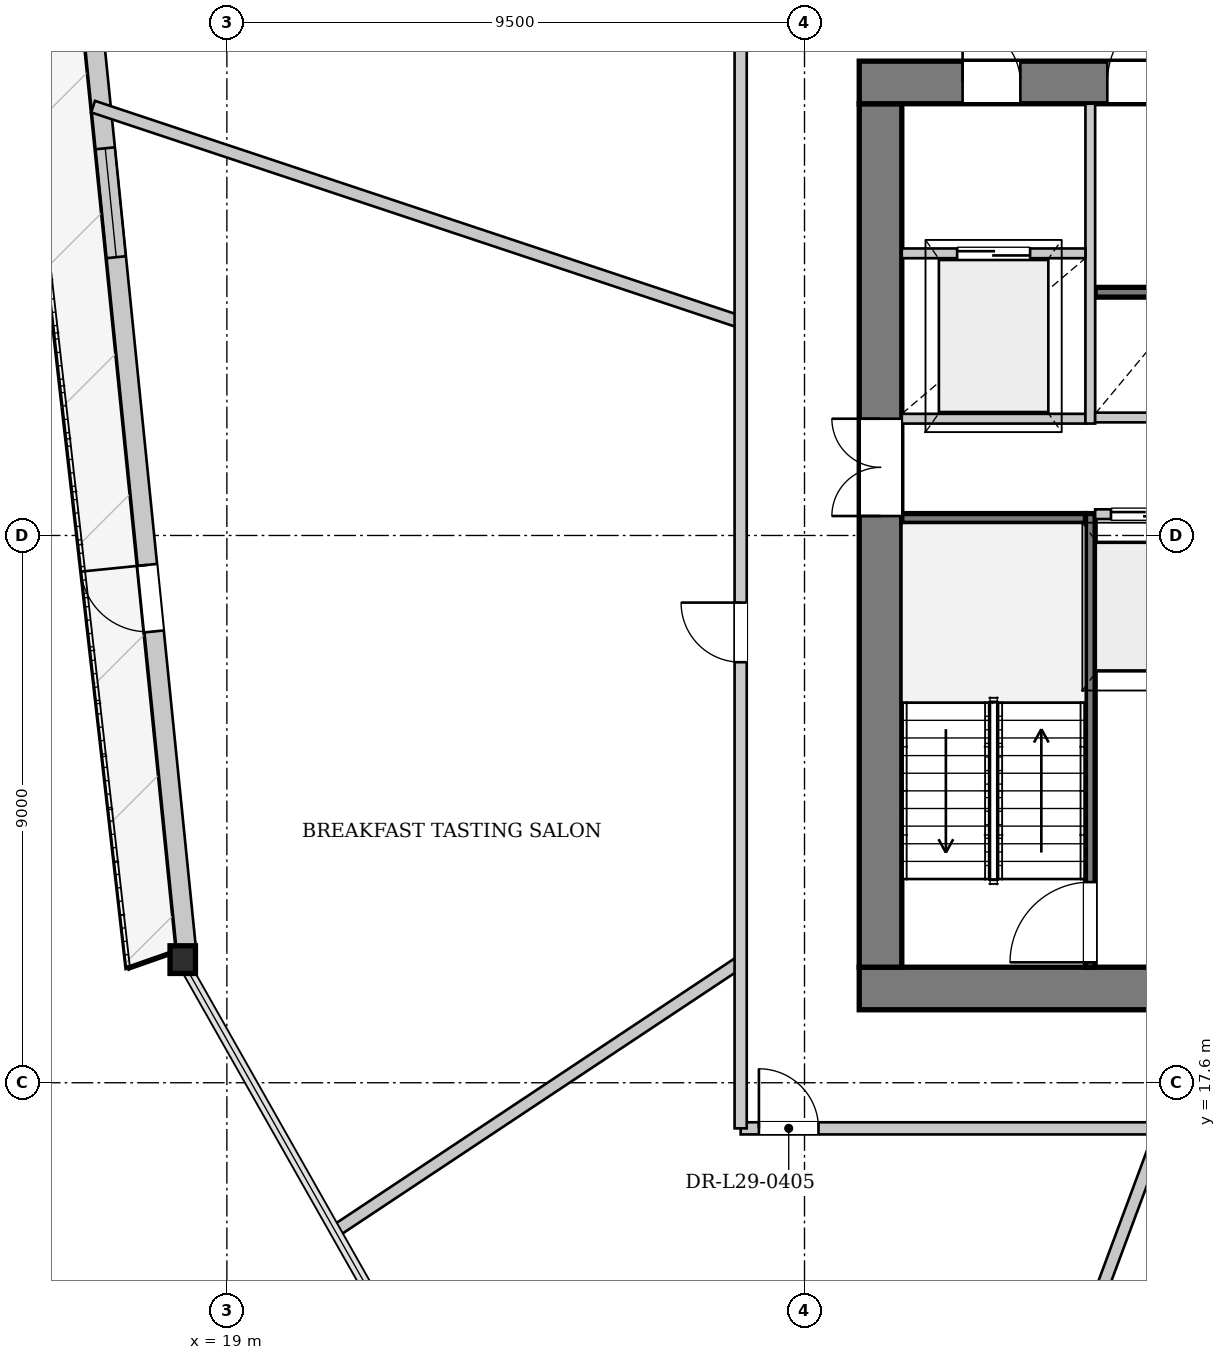
"""IFC4 building model, lengths in metres.
Left out: names, types, materials, properties, quantities, classifications, styles, units other than length and angle.
Written with IfcOpenShell. Run it as: python <this file> out.ifc"""

import sys

from ifc_helpers import new_model, si_unit, direction, frame, frame_2d, origin, origin_2d, place, context, subcontext, project, spatial, rectangle, i_section, extrude, source, transform, mapped, element, fill, save


model = new_model("IFC4")
c1 = context("Model", 3, precision=1e-05, world=origin(), true_north=direction((0.0, 1.0)))
c2 = subcontext(c1, "Body", "Model", "MODEL_VIEW")
j1 = project(units=[si_unit("LENGTHUNIT", "METRE"), si_unit("PLANEANGLEUNIT", "RADIAN")], contexts=[c1])
p1 = place(None, origin())
s1 = spatial("IfcSite", under=j1, at=p1, CompositionType="ELEMENT")
p2 = place(p1, origin())
s2 = spatial("IfcBuilding", under=s1, at=p2, CompositionType="ELEMENT")
p3 = place(p2, frame((0.0, 0.0, 112.8)))
s3 = spatial("IfcBuildingStorey", under=s2, at=p3, CompositionType="ELEMENT", Elevation=112.8)
m1 = source(origin(), c2, "Body", "SweptSolid", [
    extrude(i_section(OverallWidth=0.418, OverallDepth=0.455, WebThickness=0.038, FlangeThickness=0.059, at=origin_2d()), origin(), (0.0, 0.0, 1.0), 3.402),
])
p4 = place(p3, frame((18.175, 19.764, 0.0), z_axis=(0.058410255518, -0.082090088836, 0.994911784715), x_axis=(0.8147908412, 0.579755021623, 0.0)))
e1 = element("IfcColumn", 1, at=p4, inside=s3, PredefinedType="COLUMN", context=c2, shape_type="MappedRepresentation", body=[
    mapped(m1, transform((0.0, 0.0, 0.0), x_axis=(1.0, 0.0, 0.0), y_axis=(0.0, 1.0, 0.0), z_axis=(0.0, 0.0, 1.0), scale=1.0)),
])
p5 = place(p3, frame((52.022, 16.023, 0.0), z_axis=(0.0, 0.0, 1.0), x_axis=(-0.831442115586, -0.55561138256, 0.0)))
e2 = element("IfcWall", 2, at=p5, inside=s3, PredefinedType="SOLIDWALL", context=c2, shape_type="SweptSolid", body=[
    extrude(rectangle(XDim=23.92, YDim=0.32, at=frame_2d((11.96, 0.0))), origin(), (0.0, 0.0, 1.0), 2.692),
])
p6 = place(p5, frame((7.104, 0.0, 0.0)))
e3 = element("IfcOpeningElement", 3, at=p6, cuts=e2, PredefinedType="OPENING", context=c2, shape_type="SweptSolid", body=[
    extrude(rectangle(XDim=1.1, YDim=2.3, at=frame_2d((0.55, 1.15))), frame((0.0, 0.17, 0.0), z_axis=(0.0, -1.0, 0.0), x_axis=(1.0, 0.0, 0.0)), (0.0, 0.0, 1.0), 0.34),
])
p7 = place(p5, frame((16.801, 0.0, 0.372)))
e4 = element("IfcOpeningElement", 4, at=p7, cuts=e2, PredefinedType="OPENING", context=c2, shape_type="SweptSolid", body=[
    extrude(rectangle(XDim=1.8, YDim=2.2, at=frame_2d((0.9, 1.1))), frame((0.0, 0.17, 0.0), z_axis=(0.0, -1.0, 0.0), x_axis=(1.0, 0.0, 0.0)), (0.0, 0.0, 1.0), 0.34),
])
p8 = place(p3, frame((18.334, 19.781, 0.0), z_axis=(0.0, 0.0, 1.0), x_axis=(-0.1006962092, 0.994917219397, 0.0)))
e5 = element("IfcWall", 5, at=p8, inside=s3, PredefinedType="SOLIDWALL", context=c2, shape_type="SweptSolid", body=[
    extrude(rectangle(XDim=18.182, YDim=0.32, at=frame_2d((9.091, 0.0))), origin(), (0.0, 0.0, 1.0), 2.692),
])
p9 = place(p8, frame((5.268, 0.0, 0.0)))
e6 = element("IfcOpeningElement", 6, at=p9, cuts=e5, PredefinedType="OPENING", context=c2, shape_type="SweptSolid", body=[
    extrude(rectangle(XDim=1.1, YDim=2.3, at=frame_2d((0.55, 1.15))), frame((0.0, 0.17, 0.0), z_axis=(0.0, -1.0, 0.0), x_axis=(1.0, 0.0, 0.0)), (0.0, 0.0, 1.0), 0.34),
])
p10 = place(p8, frame((11.454, 0.0, 0.372)))
e7 = element("IfcOpeningElement", 7, at=p10, cuts=e5, PredefinedType="OPENING", context=c2, shape_type="SweptSolid", body=[
    extrude(rectangle(XDim=1.8, YDim=2.2, at=frame_2d((0.9, 1.1))), frame((0.0, 0.17, 0.0), z_axis=(0.0, -1.0, 0.0), x_axis=(1.0, 0.0, 0.0)), (0.0, 0.0, 1.0), 0.34),
])
p11 = place(p3, frame((46.6, 19.15, 0.0), z_axis=(0.0, 0.0, 1.0), x_axis=(-1.0, 0.0, 0.0)))
e8 = element("IfcWall", 8, at=p11, inside=s3, PredefinedType="SHEAR", context=c2, shape_type="SweptSolid", body=[
    extrude(rectangle(XDim=17.2, YDim=0.7, at=frame_2d((8.6, 0.0))), origin(), (0.0, 0.0, 1.0), 3.3),
])
p12 = place(p11, frame((4.8, 0.0, 0.0)))
e9 = element("IfcOpeningElement", 9, at=p12, cuts=e8, PredefinedType="OPENING", context=c2, shape_type="SweptSolid", body=[
    extrude(rectangle(XDim=1.12, YDim=2.25, at=frame_2d((0.56, 1.125))), frame((0.0, 0.36, 0.0), z_axis=(0.0, -1.0, 0.0), x_axis=(1.0, 0.0, 0.0)), (0.0, 0.0, 1.0), 0.72),
])
p13 = place(p11, frame((11.3, 0.0, 0.0)))
e10 = element("IfcOpeningElement", 10, at=p13, cuts=e8, PredefinedType="OPENING", context=c2, shape_type="SweptSolid", body=[
    extrude(rectangle(XDim=1.12, YDim=2.25, at=frame_2d((0.56, 1.125))), frame((0.0, 0.36, 0.0), z_axis=(0.0, -1.0, 0.0), x_axis=(1.0, 0.0, 0.0)), (0.0, 0.0, 1.0), 0.72),
])
p14 = place(p3, frame((29.75, 19.5, 0.0), z_axis=(0.0, 0.0, 1.0), x_axis=(0.0, 1.0, 0.0)))
e11 = element("IfcWall", 11, at=p14, inside=s3, PredefinedType="SHEAR", context=c2, shape_type="SweptSolid", body=[
    extrude(rectangle(XDim=14.2, YDim=0.7, at=frame_2d((7.1, 0.0))), origin(), (0.0, 0.0, 1.0), 3.3),
])
p15 = place(p14, frame((7.42, 0.0, 0.0)))
e12 = element("IfcOpeningElement", 12, at=p15, cuts=e11, PredefinedType="OPENING", context=c2, shape_type="SweptSolid", body=[
    extrude(rectangle(XDim=1.6, YDim=2.2, at=frame_2d((0.8, 1.1))), frame((0.0, 0.36, 0.0), z_axis=(0.0, -1.0, 0.0), x_axis=(1.0, 0.0, 0.0)), (0.0, 0.0, 1.0), 0.72),
])
p16 = place(p3, frame((29.4, 34.05, 0.0), z_axis=(0.0, 0.0, 1.0), x_axis=(1.0, 0.0, 0.0)))
e13 = element("IfcWall", 13, at=p16, inside=s3, PredefinedType="SHEAR", context=c2, shape_type="SweptSolid", body=[
    extrude(rectangle(XDim=17.2, YDim=0.7, at=frame_2d((8.6, 0.0))), origin(), (0.0, 0.0, 1.0), 3.3),
])
p17 = place(p16, frame((1.7, 0.0, 0.0)))
e14 = element("IfcOpeningElement", 14, at=p17, cuts=e13, PredefinedType="OPENING", context=c2, shape_type="SweptSolid", body=[
    extrude(rectangle(XDim=0.95, YDim=2.1, at=frame_2d((0.475, 1.05))), frame((0.0, 0.36, 0.0), z_axis=(0.0, -1.0, 0.0), x_axis=(1.0, 0.0, 0.0)), (0.0, 0.0, 1.0), 0.72),
])
p18 = place(p16, frame((4.08, 0.0, 0.0)))
e15 = element("IfcOpeningElement", 15, at=p18, cuts=e13, PredefinedType="OPENING", context=c2, shape_type="SweptSolid", body=[
    extrude(rectangle(XDim=1.32, YDim=2.2, at=frame_2d((0.66, 1.1))), frame((0.0, 0.36, 0.0), z_axis=(0.0, -1.0, 0.0), x_axis=(1.0, 0.0, 0.0)), (0.0, 0.0, 1.0), 0.72),
])
p19 = place(p16, frame((15.15, 0.0, 0.0)))
e16 = element("IfcOpeningElement", 16, at=p19, cuts=e13, PredefinedType="OPENING", context=c2, shape_type="SweptSolid", body=[
    extrude(rectangle(XDim=0.95, YDim=2.1, at=frame_2d((0.475, 1.05))), frame((0.0, 0.36, 0.0), z_axis=(0.0, -1.0, 0.0), x_axis=(1.0, 0.0, 0.0)), (0.0, 0.0, 1.0), 0.72),
])
p20 = place(p3, frame((33.2, 19.5, 0.0), z_axis=(0.0, 0.0, 1.0), x_axis=(0.0, 1.0, 0.0)))
e17 = element("IfcWall", 17, at=p20, inside=s3, PredefinedType="PARTITIONING", context=c2, shape_type="SweptSolid", body=[
    extrude(rectangle(XDim=7.46, YDim=0.16, at=frame_2d((3.73, 0.0))), origin(), (0.0, 0.0, 1.0), 3.3),
])
p21 = place(p20, frame((0.08, 0.0, 0.0)))
e18 = element("IfcOpeningElement", 18, at=p21, cuts=e17, PredefinedType="OPENING", context=c2, shape_type="SweptSolid", body=[
    extrude(rectangle(XDim=1.32, YDim=2.2, at=frame_2d((0.66, 1.1))), frame((0.0, 0.09, 0.0), z_axis=(0.0, -1.0, 0.0), x_axis=(1.0, 0.0, 0.0)), (0.0, 0.0, 1.0), 0.18),
])
p22 = place(p3, frame((30.1, 26.88, 0.0), z_axis=(0.0, 0.0, 1.0), x_axis=(1.0, 0.0, 0.0)))
e19 = element("IfcWall", 19, at=p22, inside=s3, PredefinedType="PARTITIONING", context=c2, shape_type="SweptSolid", body=[
    extrude(rectangle(XDim=3.02, YDim=0.16, at=frame_2d((1.51, 0.0))), origin(), (0.0, 0.0, 1.0), 3.3),
])
p23 = place(p3, frame((33.28, 30.6, 0.0), z_axis=(0.0, 0.0, 1.0), x_axis=(1.0, 0.0, 0.0)))
e20 = element("IfcWall", 20, at=p23, inside=s3, PredefinedType="PARTITIONING", context=c2, shape_type="SweptSolid", body=[
    extrude(rectangle(XDim=7.3, YDim=0.16, at=frame_2d((3.65, 0.0))), origin(), (0.0, 0.0, 1.0), 3.3),
])
p24 = place(p3, frame((33.28, 24.49, 0.0), z_axis=(0.0, 0.0, 1.0), x_axis=(1.0, 0.0, 0.0)))
e21 = element("IfcWall", 21, at=p24, inside=s3, PredefinedType="PARTITIONING", context=c2, shape_type="SweptSolid", body=[
    extrude(rectangle(XDim=9.44, YDim=0.16, at=frame_2d((4.72, 0.0))), origin(), (0.0, 0.0, 1.0), 3.3),
])
p25 = place(p3, frame((30.1, 28.52, 0.0), z_axis=(0.0, 0.0, 1.0), x_axis=(1.0, 0.0, 0.0)))
e22 = element("IfcWall", 22, at=p25, inside=s3, PredefinedType="PARTITIONING", context=c2, shape_type="SweptSolid", body=[
    extrude(rectangle(XDim=3.02, YDim=0.16, at=frame_2d((1.51, 0.0))), origin(), (0.0, 0.0, 1.0), 3.3),
])
p26 = place(p3, frame((33.2, 28.44, 0.0), z_axis=(0.0, 0.0, 1.0), x_axis=(0.0, 1.0, 0.0)))
e23 = element("IfcWall", 23, at=p26, inside=s3, PredefinedType="PARTITIONING", context=c2, shape_type="SweptSolid", body=[
    extrude(rectangle(XDim=5.26, YDim=0.16, at=frame_2d((2.63, 0.0))), origin(), (0.0, 0.0, 1.0), 3.3),
])
p27 = place(p3, frame((30.1, 31.24, 0.0), z_axis=(0.0, 0.0, 1.0), x_axis=(1.0, 0.0, 0.0)))
e24 = element("IfcWall", 24, at=p27, inside=s3, PredefinedType="PARTITIONING", context=c2, shape_type="SweptSolid", body=[
    extrude(rectangle(XDim=3.02, YDim=0.16, at=frame_2d((1.51, 0.0))), origin(), (0.0, 0.0, 1.0), 3.3),
])
p28 = place(p27, frame((0.91, 0.0, 0.0)))
e25 = element("IfcOpeningElement", 25, at=p28, cuts=e24, PredefinedType="OPENING", context=c2, shape_type="SweptSolid", body=[
    extrude(rectangle(XDim=1.2, YDim=2.2, at=frame_2d((0.6, 1.1))), frame((0.0, 0.09, 0.0), z_axis=(0.0, -1.0, 0.0), x_axis=(1.0, 0.0, 0.0)), (0.0, 0.0, 1.0), 0.18),
])
p29 = place(p3, frame((33.28, 26.95, 0.0), z_axis=(0.0, 0.0, 1.0), x_axis=(1.0, 0.0, 0.0)))
e26 = element("IfcWall", 26, at=p29, inside=s3, PredefinedType="PARTITIONING", context=c2, shape_type="SweptSolid", body=[
    extrude(rectangle(XDim=9.44, YDim=0.16, at=frame_2d((4.72, 0.0))), origin(), (0.0, 0.0, 1.0), 3.3),
])
p30 = place(p29, frame((0.26, 0.0, 0.0)))
e27 = element("IfcOpeningElement", 27, at=p30, cuts=e26, PredefinedType="OPENING", context=c2, shape_type="SweptSolid", body=[
    extrude(rectangle(XDim=1.1, YDim=2.2, at=frame_2d((0.55, 1.1))), frame((0.0, 0.09, 0.0), z_axis=(0.0, -1.0, 0.0), x_axis=(1.0, 0.0, 0.0)), (0.0, 0.0, 1.0), 0.18),
])
p31 = place(p29, frame((2.01, 0.0, 0.0)))
e28 = element("IfcOpeningElement", 28, at=p31, cuts=e26, PredefinedType="OPENING", context=c2, shape_type="SweptSolid", body=[
    extrude(rectangle(XDim=1.1, YDim=2.2, at=frame_2d((0.55, 1.1))), frame((0.0, 0.09, 0.0), z_axis=(0.0, -1.0, 0.0), x_axis=(1.0, 0.0, 0.0)), (0.0, 0.0, 1.0), 0.18),
])
p32 = place(p29, frame((3.76, 0.0, 0.0)))
e29 = element("IfcOpeningElement", 29, at=p32, cuts=e26, PredefinedType="OPENING", context=c2, shape_type="SweptSolid", body=[
    extrude(rectangle(XDim=1.1, YDim=2.2, at=frame_2d((0.55, 1.1))), frame((0.0, 0.09, 0.0), z_axis=(0.0, -1.0, 0.0), x_axis=(1.0, 0.0, 0.0)), (0.0, 0.0, 1.0), 0.18),
])
p33 = place(p29, frame((5.51, 0.0, 0.0)))
e30 = element("IfcOpeningElement", 30, at=p33, cuts=e26, PredefinedType="OPENING", context=c2, shape_type="SweptSolid", body=[
    extrude(rectangle(XDim=1.1, YDim=2.2, at=frame_2d((0.55, 1.1))), frame((0.0, 0.09, 0.0), z_axis=(0.0, -1.0, 0.0), x_axis=(1.0, 0.0, 0.0)), (0.0, 0.0, 1.0), 0.18),
])
p34 = place(p3, frame((33.28, 28.54, 0.0), z_axis=(0.0, 0.0, 1.0), x_axis=(1.0, 0.0, 0.0)))
e31 = element("IfcWall", 31, at=p34, inside=s3, PredefinedType="PARTITIONING", context=c2, shape_type="SweptSolid", body=[
    extrude(rectangle(XDim=12.62, YDim=0.16, at=frame_2d((6.31, 0.0))), origin(), (0.0, 0.0, 1.0), 3.3),
])
p35 = place(p3, frame((34.374, 16.85, 0.0), z_axis=(0.0, 0.0, 1.0), x_axis=(-0.348574362272, -0.937281128566, 0.0)))
e32 = element("IfcWall", 32, at=p35, inside=s3, PredefinedType="PARTITIONING", context=c2, shape_type="SweptSolid", body=[
    extrude(rectangle(XDim=14.366, YDim=0.2, at=frame_2d((7.183, 0.0))), origin(), (0.0, 0.0, 1.0), 3.3),
])
p36 = place(p3, frame((27.45, 30.11, 0.0), z_axis=(0.0, 0.0, 1.0), x_axis=(-0.948876702019, 0.315646961598, 0.0)))
e33 = element("IfcWall", 33, at=p36, inside=s3, PredefinedType="PARTITIONING", context=c2, shape_type="SweptSolid", body=[
    extrude(rectangle(XDim=11.224, YDim=0.2, at=frame_2d((5.612, 0.0))), origin(), (0.0, 0.0, 1.0), 3.3),
])
p37 = place(p3, frame((27.45, 19.591, 0.0), z_axis=(0.0, 0.0, 1.0), x_axis=(-0.832915827801, -0.55339969624, 0.0)))
e34 = element("IfcWall", 34, at=p37, inside=s3, PredefinedType="PARTITIONING", context=c2, shape_type="SweptSolid", body=[
    extrude(rectangle(XDim=7.975, YDim=0.2, at=frame_2d((3.988, 0.0))), origin(), (0.0, 0.0, 1.0), 3.3),
])
p38 = place(p3, frame((27.45, 16.85, 0.0), z_axis=(0.0, 0.0, 1.0), x_axis=(1.0, 0.0, 0.0)))
e35 = element("IfcWall", 35, at=p38, inside=s3, PredefinedType="PARTITIONING", context=c2, shape_type="SweptSolid", body=[
    extrude(rectangle(XDim=21.1, YDim=0.2, at=frame_2d((10.55, 0.0))), origin(), (0.0, 0.0, 1.0), 2.985),
])
p39 = place(p38, frame((7.933, 0.0, 0.0)))
e36 = element("IfcOpeningElement", 36, at=p39, cuts=e35, PredefinedType="OPENING", context=c2, shape_type="SweptSolid", body=[
    extrude(rectangle(XDim=0.98, YDim=2.15, at=frame_2d((0.49, 1.075))), frame((0.0, 0.11, 0.0), z_axis=(0.0, -1.0, 0.0), x_axis=(1.0, 0.0, 0.0)), (0.0, 0.0, 1.0), 0.22),
])
p40 = place(p38, frame((19.82, 0.0, 0.0)))
e37 = element("IfcOpeningElement", 37, at=p40, cuts=e35, PredefinedType="OPENING", context=c2, shape_type="SweptSolid", body=[
    extrude(rectangle(XDim=0.98, YDim=2.15, at=frame_2d((0.49, 1.075))), frame((0.0, 0.11, 0.0), z_axis=(0.0, -1.0, 0.0), x_axis=(1.0, 0.0, 0.0)), (0.0, 0.0, 1.0), 0.22),
])
p41 = place(p38, frame((0.3, 0.0, 0.0)))
e38 = element("IfcOpeningElement", 38, at=p41, cuts=e35, PredefinedType="OPENING", context=c2, shape_type="SweptSolid", body=[
    extrude(rectangle(XDim=0.98, YDim=2.15, at=frame_2d((0.49, 1.075))), frame((0.0, 0.11, 0.0), z_axis=(0.0, -1.0, 0.0), x_axis=(1.0, 0.0, 0.0)), (0.0, 0.0, 1.0), 0.22),
])
p42 = place(p3, frame((27.45, 16.85, 0.0), z_axis=(0.0, 0.0, 1.0), x_axis=(0.0, 1.0, 0.0)))
e39 = element("IfcWall", 39, at=p42, inside=s3, PredefinedType="PARTITIONING", context=c2, shape_type="SweptSolid", body=[
    extrude(rectangle(XDim=19.5, YDim=0.2, at=frame_2d((9.75, 0.0))), origin(), (0.0, 0.0, 1.0), 3.3),
])
p43 = place(p42, frame((18.22, 0.0, 0.0)))
e40 = element("IfcOpeningElement", 40, at=p43, cuts=e39, PredefinedType="OPENING", context=c2, shape_type="SweptSolid", body=[
    extrude(rectangle(XDim=0.98, YDim=2.15, at=frame_2d((0.49, 1.075))), frame((0.0, 0.11, 0.0), z_axis=(0.0, -1.0, 0.0), x_axis=(1.0, 0.0, 0.0)), (0.0, 0.0, 1.0), 0.22),
])
p44 = place(p42, frame((7.666, 0.0, 0.0)))
e41 = element("IfcOpeningElement", 41, at=p44, cuts=e39, PredefinedType="OPENING", context=c2, shape_type="SweptSolid", body=[
    extrude(rectangle(XDim=0.98, YDim=2.15, at=frame_2d((0.49, 1.075))), frame((0.0, 0.11, 0.0), z_axis=(0.0, -1.0, 0.0), x_axis=(1.0, 0.0, 0.0)), (0.0, 0.0, 1.0), 0.22),
])
m2 = source(origin(), c2, "Body", "SweptSolid", [
    extrude(rectangle(XDim=1.1, YDim=2.3, at=frame_2d((0.55, 1.15))), frame((0.0, 0.025, 0.0), z_axis=(0.0, -1.0, 0.0), x_axis=(1.0, 0.0, 0.0)), (0.0, 0.0, 1.0), 0.05),
])
p45 = place(p9, origin())
e42 = element("IfcDoor", 42, at=p45, inside=s3, OperationType="SINGLE_SWING_RIGHT", PredefinedType="DOOR", context=c2, shape_type="MappedRepresentation", body=[
    mapped(m2, transform((0.0, 0.0, 0.0), x_axis=(1.0, 0.0, 0.0), y_axis=(0.0, 1.0, 0.0), z_axis=(0.0, 0.0, 1.0), scale=1.0)),
])
fill(e6, e42)
m3 = source(origin(), c2, "Body", "SweptSolid", [
    extrude(rectangle(XDim=1.8, YDim=2.2, at=frame_2d((0.9, 1.1))), frame((0.0, 0.03, 0.0), z_axis=(0.0, -1.0, 0.0), x_axis=(1.0, 0.0, 0.0)), (0.0, 0.0, 1.0), 0.06),
])
p46 = place(p10, origin())
e43 = element("IfcWindow", 43, at=p46, inside=s3, PartitioningType="SINGLE_PANEL", PredefinedType="WINDOW", context=c2, shape_type="MappedRepresentation", body=[
    mapped(m3, transform((0.0, 0.0, 0.0), x_axis=(1.0, 0.0, 0.0), y_axis=(0.0, 1.0, 0.0), z_axis=(0.0, 0.0, 1.0), scale=1.0)),
])
fill(e7, e43)
m4 = source(origin(), c2, "Body", "SweptSolid", [
    extrude(rectangle(XDim=1.6, YDim=2.2, at=frame_2d((0.8, 1.1))), frame((0.0, 0.025, 0.0), z_axis=(0.0, -1.0, 0.0), x_axis=(1.0, 0.0, 0.0)), (0.0, 0.0, 1.0), 0.05),
])
p47 = place(p15, origin())
e44 = element("IfcDoor", 44, at=p47, inside=s3, OperationType="DOUBLE_DOOR_SINGLE_SWING", PredefinedType="DOOR", context=c2, shape_type="MappedRepresentation", body=[
    mapped(m4, transform((0.0, 0.0, 0.0), x_axis=(1.0, 0.0, 0.0), y_axis=(0.0, 1.0, 0.0), z_axis=(0.0, 0.0, 1.0), scale=1.0)),
])
fill(e12, e44)
m5 = source(origin(), c2, "Body", "SweptSolid", [
    extrude(rectangle(XDim=0.95, YDim=2.1, at=frame_2d((0.475, 1.05))), frame((0.0, 0.025, 0.0), z_axis=(0.0, -1.0, 0.0), x_axis=(1.0, 0.0, 0.0)), (0.0, 0.0, 1.0), 0.05),
])
p48 = place(p17, origin())
e45 = element("IfcDoor", 45, at=p48, inside=s3, OperationType="SINGLE_SWING_LEFT", PredefinedType="DOOR", context=c2, shape_type="MappedRepresentation", body=[
    mapped(m5, transform((0.0, 0.0, 0.0), x_axis=(1.0, 0.0, 0.0), y_axis=(0.0, 1.0, 0.0), z_axis=(0.0, 0.0, 1.0), scale=1.0)),
])
fill(e14, e45)
m6 = source(origin(), c2, "Body", "SweptSolid", [
    extrude(rectangle(XDim=1.32, YDim=2.2, at=frame_2d((0.66, 1.1))), frame((0.0, 0.025, 0.0), z_axis=(0.0, -1.0, 0.0), x_axis=(1.0, 0.0, 0.0)), (0.0, 0.0, 1.0), 0.05),
])
p49 = place(p18, origin())
e46 = element("IfcDoor", 46, at=p49, inside=s3, OperationType="SINGLE_SWING_RIGHT", PredefinedType="DOOR", context=c2, shape_type="MappedRepresentation", body=[
    mapped(m6, transform((0.0, 0.0, 0.0), x_axis=(1.0, 0.0, 0.0), y_axis=(0.0, 1.0, 0.0), z_axis=(0.0, 0.0, 1.0), scale=1.0)),
])
fill(e15, e46)
p50 = place(p21, origin())
e47 = element("IfcDoor", 47, at=p50, inside=s3, OperationType="SINGLE_SWING_LEFT", PredefinedType="DOOR", context=c2, shape_type="MappedRepresentation", body=[
    mapped(m6, transform((0.0, 0.0, 0.0), x_axis=(1.0, 0.0, 0.0), y_axis=(0.0, 1.0, 0.0), z_axis=(0.0, 0.0, 1.0), scale=1.0)),
])
fill(e18, e47)
m7 = source(origin(), c2, "Body", "SweptSolid", [
    extrude(rectangle(XDim=1.2, YDim=2.2, at=frame_2d((0.6, 1.1))), frame((0.0, 0.025, 0.0), z_axis=(0.0, -1.0, 0.0), x_axis=(1.0, 0.0, 0.0)), (0.0, 0.0, 1.0), 0.05),
])
p51 = place(p28, origin())
e48 = element("IfcDoor", 48, at=p51, inside=s3, OperationType="DOUBLE_DOOR_SLIDING", PredefinedType="DOOR", context=c2, shape_type="MappedRepresentation", body=[
    mapped(m7, transform((0.0, 0.0, 0.0), x_axis=(1.0, 0.0, 0.0), y_axis=(0.0, 1.0, 0.0), z_axis=(0.0, 0.0, 1.0), scale=1.0)),
])
fill(e25, e48)
m8 = source(origin(), c2, "Body", "SweptSolid", [
    extrude(rectangle(XDim=1.1, YDim=2.2, at=frame_2d((0.55, 1.1))), frame((0.0, 0.025, 0.0), z_axis=(0.0, -1.0, 0.0), x_axis=(1.0, 0.0, 0.0)), (0.0, 0.0, 1.0), 0.05),
])
p52 = place(p30, origin())
e49 = element("IfcDoor", 49, at=p52, inside=s3, OperationType="DOUBLE_DOOR_SLIDING", PredefinedType="DOOR", context=c2, shape_type="MappedRepresentation", body=[
    mapped(m8, transform((0.0, 0.0, 0.0), x_axis=(1.0, 0.0, 0.0), y_axis=(0.0, 1.0, 0.0), z_axis=(0.0, 0.0, 1.0), scale=1.0)),
])
fill(e27, e49)
m9 = source(origin(), c2, "Body", "SweptSolid", [
    extrude(rectangle(XDim=0.98, YDim=2.15, at=frame_2d((0.49, 1.075))), frame((0.0, 0.025, 0.0), z_axis=(0.0, -1.0, 0.0), x_axis=(1.0, 0.0, 0.0)), (0.0, 0.0, 1.0), 0.05),
])
p53 = place(p41, origin())
e50 = element("IfcDoor", 50, at=p53, inside=s3, OperationType="SINGLE_SWING_LEFT", PredefinedType="DOOR", context=c2, shape_type="MappedRepresentation", body=[
    mapped(m9, transform((0.0, 0.0, 0.0), x_axis=(1.0, 0.0, 0.0), y_axis=(0.0, 1.0, 0.0), z_axis=(0.0, 0.0, 1.0), scale=1.0)),
])
fill(e38, e50)
p54 = place(p44, origin())
e51 = element("IfcDoor", 51, at=p54, inside=s3, OperationType="SINGLE_SWING_RIGHT", PredefinedType="DOOR", context=c2, shape_type="MappedRepresentation", body=[
    mapped(m9, transform((0.0, 0.0, 0.0), x_axis=(1.0, 0.0, 0.0), y_axis=(0.0, 1.0, 0.0), z_axis=(0.0, 0.0, 1.0), scale=1.0)),
])
fill(e41, e51)
save(model, sys.argv[1])
